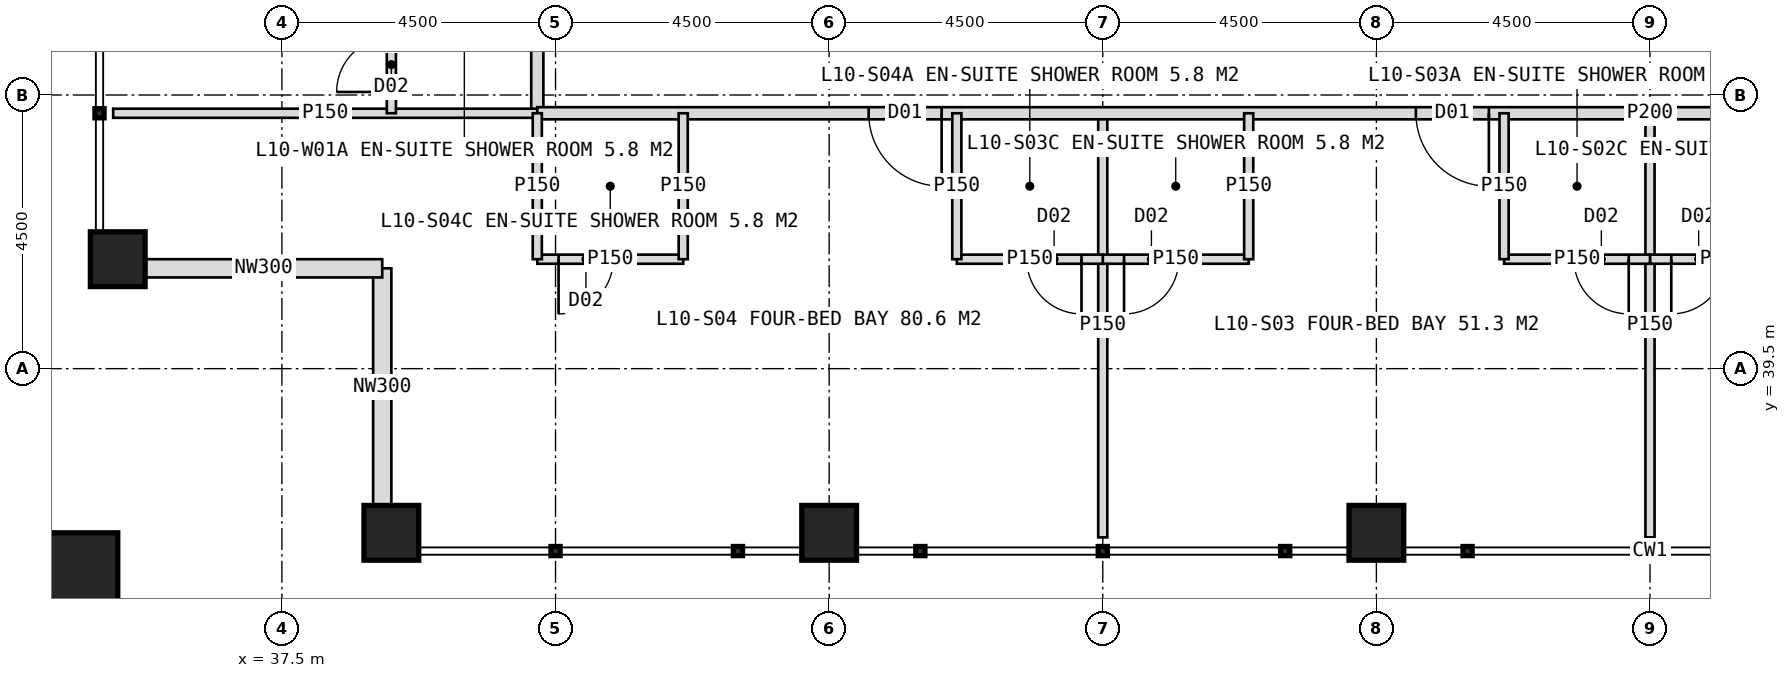
"""IFC4 building model, lengths in metres.
Left out: names, types, materials, properties, quantities, classifications, styles, units other than length and angle.
Written with IfcOpenShell. Run it as: python <this file> out.ifc"""

import sys

from ifc_helpers import new_model, si_unit, direction, frame, frame_2d, origin, origin_2d, place, context, subcontext, project, spatial, rectangle, hollow_rectangle, extrude, element, fill, save


model = new_model("IFC4")
c1 = context("Model", 3, precision=1e-05, world=origin(), true_north=direction((0.0, 1.0)))
c2 = subcontext(c1, "Body", "Model", "MODEL_VIEW")
j1 = project(units=[si_unit("LENGTHUNIT", "METRE"), si_unit("PLANEANGLEUNIT", "RADIAN")], contexts=[c1])
p1 = place(None, origin())
s1 = spatial("IfcSite", under=j1, at=p1, CompositionType="ELEMENT")
p2 = place(p1, origin())
s2 = spatial("IfcBuilding", under=s1, at=p2, CompositionType="ELEMENT")
p3 = place(p2, frame((0.0, 0.0, 47.0)))
s3 = spatial("IfcBuildingStorey", under=s2, at=p3, CompositionType="ELEMENT", Elevation=47.0)
for number, where, z_axis, x_axis in (
    (1, (39.3, 36.8, 0.0), (0.0, 0.0, 1.0), (1.0, 0.0, 0.0)),
    (2, (34.8, 41.3, 0.0), (0.0, 0.0, 1.0), (1.0, 0.0, 0.0)),
    (3, (46.5, 36.8, 0.0), (0.0, 0.0, 1.0), (1.0, 0.0, 0.0)),
    (4, (55.5, 36.8, 0.0), (0.0, 0.0, 1.0), (1.0, 0.0, 0.0)),
):
    element("IfcColumn", number, at=place(p3, frame(where, z_axis=z_axis, x_axis=x_axis)), inside=s3, PredefinedType="COLUMN", context=c2, shape_type="SweptSolid", body=[
        extrude(hollow_rectangle(XDim=0.9, YDim=0.9, WallThickness=0.08, at=origin_2d()), origin(), (0.0, 0.0, 1.0), 4.0),
    ])
p4 = place(p3, frame((33.9, 35.9, 0.0), z_axis=(0.0, 0.0, 1.0), x_axis=(1.0, 0.0, 0.0)))
e5 = element("IfcColumn", 5, at=p4, inside=s3, PredefinedType="COLUMN", context=c2, shape_type="SweptSolid", body=[
    extrude(hollow_rectangle(XDim=1.8, YDim=1.8, WallThickness=0.1, at=origin_2d()), origin(), (0.0, 0.0, 1.0), 4.0),
])
for number, where, z_axis, x_axis in (
    (6, (39.15, 37.25, 0.0), (0.0, 0.0, 1.0), (0.0, 1.0, 0.0)),
    (7, (39.15, 41.15, 0.0), (0.0, 0.0, 1.0), (-1.0, 0.0, 0.0)),
):
    element("IfcWall", number, at=place(p3, frame(where, z_axis=z_axis, x_axis=x_axis)), inside=s3, PredefinedType="ELEMENTEDWALL", context=c2, shape_type="SweptSolid", body=[
        extrude(rectangle(XDim=3.9, YDim=0.3, at=frame_2d((1.95, 0.0))), origin(), (0.0, 0.0, 1.0), 2.95),
    ])
p5 = place(p3, frame((41.7, 43.7, 0.0), z_axis=(0.0, 0.0, 1.0), x_axis=(0.0, 1.0, 0.0)))
e8 = element("IfcWall", 8, at=p5, inside=s3, PredefinedType="PARTITIONING", context=c2, shape_type="SweptSolid", body=[
    extrude(rectangle(XDim=36.6, YDim=0.2, at=frame_2d((18.3, 0.0))), origin(), (0.0, 0.0, 1.0), 3.75),
])
p6 = place(p5, frame((2.65, 0.0, 0.0)))
e9 = element("IfcOpeningElement", 9, at=p6, cuts=e8, PredefinedType="OPENING", context=c2, shape_type="SweptSolid", body=[
    extrude(rectangle(XDim=1.2, YDim=2.2, at=frame_2d((0.6, 1.1))), frame((0.0, 0.11, 0.0), z_axis=(0.0, -1.0, 0.0), x_axis=(1.0, 0.0, 0.0)), (0.0, 0.0, 1.0), 0.22),
])
p7 = place(p5, frame((8.95, 0.0, 0.0)))
e10 = element("IfcOpeningElement", 10, at=p7, cuts=e8, PredefinedType="OPENING", context=c2, shape_type="SweptSolid", body=[
    extrude(rectangle(XDim=1.2, YDim=2.2, at=frame_2d((0.6, 1.1))), frame((0.0, 0.11, 0.0), z_axis=(0.0, -1.0, 0.0), x_axis=(1.0, 0.0, 0.0)), (0.0, 0.0, 1.0), 0.22),
])
p8 = place(p5, frame((14.95, 0.0, 0.0)))
e11 = element("IfcOpeningElement", 11, at=p8, cuts=e8, PredefinedType="OPENING", context=c2, shape_type="SweptSolid", body=[
    extrude(rectangle(XDim=1.2, YDim=2.2, at=frame_2d((0.6, 1.1))), frame((0.0, 0.11, 0.0), z_axis=(0.0, -1.0, 0.0), x_axis=(1.0, 0.0, 0.0)), (0.0, 0.0, 1.0), 0.22),
])
p9 = place(p5, frame((20.95, 0.0, 0.0)))
e12 = element("IfcOpeningElement", 12, at=p9, cuts=e8, PredefinedType="OPENING", context=c2, shape_type="SweptSolid", body=[
    extrude(rectangle(XDim=1.2, YDim=2.2, at=frame_2d((0.6, 1.1))), frame((0.0, 0.11, 0.0), z_axis=(0.0, -1.0, 0.0), x_axis=(1.0, 0.0, 0.0)), (0.0, 0.0, 1.0), 0.22),
])
p10 = place(p5, frame((29.95, 0.0, 0.0)))
e13 = element("IfcOpeningElement", 13, at=p10, cuts=e8, PredefinedType="OPENING", context=c2, shape_type="SweptSolid", body=[
    extrude(rectangle(XDim=1.2, YDim=2.2, at=frame_2d((0.6, 1.1))), frame((0.0, 0.11, 0.0), z_axis=(0.0, -1.0, 0.0), x_axis=(1.0, 0.0, 0.0)), (0.0, 0.0, 1.0), 0.22),
])
p11 = place(p3, frame((41.7, 43.7, 0.0), z_axis=(0.0, 0.0, 1.0), x_axis=(-1.0, 0.0, 0.0)))
e14 = element("IfcWall", 14, at=p11, inside=s3, PredefinedType="PARTITIONING", context=c2, shape_type="SweptSolid", body=[
    extrude(rectangle(XDim=6.975, YDim=0.15, at=frame_2d((3.487, 0.0))), origin(), (0.0, 0.0, 1.0), 3.75),
])
p12 = place(p3, frame((39.3, 43.7, 0.0), z_axis=(0.0, 0.0, 1.0), x_axis=(0.0, 1.0, 0.0)))
e15 = element("IfcWall", 15, at=p12, inside=s3, PredefinedType="PARTITIONING", context=c2, shape_type="SweptSolid", body=[
    extrude(rectangle(XDim=2.4, YDim=0.15, at=frame_2d((1.2, 0.0))), origin(), (0.0, 0.0, 1.0), 2.95),
])
p13 = place(p12, frame((0.35, 0.0, 0.0)))
e16 = element("IfcOpeningElement", 16, at=p13, cuts=e15, PredefinedType="OPENING", context=c2, shape_type="SweptSolid", body=[
    extrude(rectangle(XDim=0.9, YDim=2.1, at=frame_2d((0.45, 1.05))), frame((0.0, 0.085, 0.0), z_axis=(0.0, -1.0, 0.0), x_axis=(1.0, 0.0, 0.0)), (0.0, 0.0, 1.0), 0.17),
])
p14 = place(p3, frame((60.0, 43.7, 0.0), z_axis=(0.0, 0.0, 1.0), x_axis=(0.0, -1.0, 0.0)))
e17 = element("IfcWall", 17, at=p14, inside=s3, PredefinedType="PARTITIONING", context=c2, shape_type="SweptSolid", body=[
    extrude(rectangle(XDim=6.975, YDim=0.15, at=frame_2d((3.487, 0.0))), origin(), (0.0, 0.0, 1.0), 2.75),
])
p15 = place(p3, frame((51.0, 43.7, 0.0), z_axis=(0.0, 0.0, 1.0), x_axis=(0.0, -1.0, 0.0)))
e18 = element("IfcWall", 18, at=p15, inside=s3, PredefinedType="PARTITIONING", context=c2, shape_type="SweptSolid", body=[
    extrude(rectangle(XDim=6.975, YDim=0.15, at=frame_2d((3.487, 0.0))), origin(), (0.0, 0.0, 1.0), 3.75),
])
p16 = place(p3, frame((78.3, 43.7, 0.0), z_axis=(0.0, 0.0, 1.0), x_axis=(-1.0, 0.0, 0.0)))
e19 = element("IfcWall", 19, at=p16, inside=s3, PredefinedType="PARTITIONING", context=c2, shape_type="SweptSolid", body=[
    extrude(rectangle(XDim=36.6, YDim=0.2, at=frame_2d((18.3, 0.0))), origin(), (0.0, 0.0, 1.0), 3.75),
])
p17 = place(p16, frame((2.65, 0.0, 0.0)))
e20 = element("IfcOpeningElement", 20, at=p17, cuts=e19, PredefinedType="OPENING", context=c2, shape_type="SweptSolid", body=[
    extrude(rectangle(XDim=1.2, YDim=2.2, at=frame_2d((0.6, 1.1))), frame((0.0, 0.11, 0.0), z_axis=(0.0, -1.0, 0.0), x_axis=(1.0, 0.0, 0.0)), (0.0, 0.0, 1.0), 0.22),
])
p18 = place(p16, frame((11.95, 0.0, 0.0)))
e21 = element("IfcOpeningElement", 21, at=p18, cuts=e19, PredefinedType="OPENING", context=c2, shape_type="SweptSolid", body=[
    extrude(rectangle(XDim=1.2, YDim=2.2, at=frame_2d((0.6, 1.1))), frame((0.0, 0.11, 0.0), z_axis=(0.0, -1.0, 0.0), x_axis=(1.0, 0.0, 0.0)), (0.0, 0.0, 1.0), 0.22),
])
p19 = place(p16, frame((20.95, 0.0, 0.0)))
e22 = element("IfcOpeningElement", 22, at=p19, cuts=e19, PredefinedType="OPENING", context=c2, shape_type="SweptSolid", body=[
    extrude(rectangle(XDim=1.2, YDim=2.2, at=frame_2d((0.6, 1.1))), frame((0.0, 0.11, 0.0), z_axis=(0.0, -1.0, 0.0), x_axis=(1.0, 0.0, 0.0)), (0.0, 0.0, 1.0), 0.22),
])
p20 = place(p16, frame((29.95, 0.0, 0.0)))
e23 = element("IfcOpeningElement", 23, at=p20, cuts=e19, PredefinedType="OPENING", context=c2, shape_type="SweptSolid", body=[
    extrude(rectangle(XDim=1.2, YDim=2.2, at=frame_2d((0.6, 1.1))), frame((0.0, 0.11, 0.0), z_axis=(0.0, -1.0, 0.0), x_axis=(1.0, 0.0, 0.0)), (0.0, 0.0, 1.0), 0.22),
])
p21 = place(p3, frame((62.4, 41.3, 0.0), z_axis=(0.0, 0.0, 1.0), x_axis=(-1.0, 0.0, 0.0)))
e24 = element("IfcWall", 24, at=p21, inside=s3, PredefinedType="PARTITIONING", context=c2, shape_type="SweptSolid", body=[
    extrude(rectangle(XDim=2.4, YDim=0.15, at=frame_2d((1.2, 0.0))), origin(), (0.0, 0.0, 1.0), 3.75),
])
p22 = place(p21, frame((1.15, 0.0, 0.0)))
e25 = element("IfcOpeningElement", 25, at=p22, cuts=e24, PredefinedType="OPENING", context=c2, shape_type="SweptSolid", body=[
    extrude(rectangle(XDim=0.9, YDim=2.1, at=frame_2d((0.45, 1.05))), frame((0.0, 0.085, 0.0), z_axis=(0.0, -1.0, 0.0), x_axis=(1.0, 0.0, 0.0)), (0.0, 0.0, 1.0), 0.17),
])
p23 = place(p3, frame((60.0, 41.3, 0.0), z_axis=(0.0, 0.0, 1.0), x_axis=(-1.0, 0.0, 0.0)))
e26 = element("IfcWall", 26, at=p23, inside=s3, PredefinedType="PARTITIONING", context=c2, shape_type="SweptSolid", body=[
    extrude(rectangle(XDim=2.4, YDim=0.15, at=frame_2d((1.2, 0.0))), origin(), (0.0, 0.0, 1.0), 3.75),
])
p24 = place(p23, frame((0.35, 0.0, 0.0)))
e27 = element("IfcOpeningElement", 27, at=p24, cuts=e26, PredefinedType="OPENING", context=c2, shape_type="SweptSolid", body=[
    extrude(rectangle(XDim=0.9, YDim=2.1, at=frame_2d((0.45, 1.05))), frame((0.0, 0.085, 0.0), z_axis=(0.0, -1.0, 0.0), x_axis=(1.0, 0.0, 0.0)), (0.0, 0.0, 1.0), 0.17),
])
p25 = place(p3, frame((57.6, 43.7, 0.0), z_axis=(0.0, 0.0, 1.0), x_axis=(0.0, -1.0, 0.0)))
e28 = element("IfcWall", 28, at=p25, inside=s3, PredefinedType="PARTITIONING", context=c2, shape_type="SweptSolid", body=[
    extrude(rectangle(XDim=2.4, YDim=0.15, at=frame_2d((1.2, 0.0))), origin(), (0.0, 0.0, 1.0), 3.75),
])
p26 = place(p3, frame((53.4, 41.3, 0.0), z_axis=(0.0, 0.0, 1.0), x_axis=(-1.0, 0.0, 0.0)))
e29 = element("IfcWall", 29, at=p26, inside=s3, PredefinedType="PARTITIONING", context=c2, shape_type="SweptSolid", body=[
    extrude(rectangle(XDim=2.4, YDim=0.15, at=frame_2d((1.2, 0.0))), origin(), (0.0, 0.0, 1.0), 3.75),
])
p27 = place(p26, frame((1.15, 0.0, 0.0)))
e30 = element("IfcOpeningElement", 30, at=p27, cuts=e29, PredefinedType="OPENING", context=c2, shape_type="SweptSolid", body=[
    extrude(rectangle(XDim=0.9, YDim=2.1, at=frame_2d((0.45, 1.05))), frame((0.0, 0.085, 0.0), z_axis=(0.0, -1.0, 0.0), x_axis=(1.0, 0.0, 0.0)), (0.0, 0.0, 1.0), 0.17),
])
p28 = place(p3, frame((53.4, 43.7, 0.0), z_axis=(0.0, 0.0, 1.0), x_axis=(0.0, -1.0, 0.0)))
e31 = element("IfcWall", 31, at=p28, inside=s3, PredefinedType="PARTITIONING", context=c2, shape_type="SweptSolid", body=[
    extrude(rectangle(XDim=2.4, YDim=0.15, at=frame_2d((1.2, 0.0))), origin(), (0.0, 0.0, 1.0), 3.75),
])
p29 = place(p3, frame((51.0, 41.3, 0.0), z_axis=(0.0, 0.0, 1.0), x_axis=(-1.0, 0.0, 0.0)))
e32 = element("IfcWall", 32, at=p29, inside=s3, PredefinedType="PARTITIONING", context=c2, shape_type="SweptSolid", body=[
    extrude(rectangle(XDim=2.4, YDim=0.15, at=frame_2d((1.2, 0.0))), origin(), (0.0, 0.0, 1.0), 3.75),
])
p30 = place(p29, frame((0.35, 0.0, 0.0)))
e33 = element("IfcOpeningElement", 33, at=p30, cuts=e32, PredefinedType="OPENING", context=c2, shape_type="SweptSolid", body=[
    extrude(rectangle(XDim=0.9, YDim=2.1, at=frame_2d((0.45, 1.05))), frame((0.0, 0.085, 0.0), z_axis=(0.0, -1.0, 0.0), x_axis=(1.0, 0.0, 0.0)), (0.0, 0.0, 1.0), 0.17),
])
p31 = place(p3, frame((48.6, 43.7, 0.0), z_axis=(0.0, 0.0, 1.0), x_axis=(0.0, -1.0, 0.0)))
e34 = element("IfcWall", 34, at=p31, inside=s3, PredefinedType="PARTITIONING", context=c2, shape_type="SweptSolid", body=[
    extrude(rectangle(XDim=2.4, YDim=0.15, at=frame_2d((1.2, 0.0))), origin(), (0.0, 0.0, 1.0), 3.75),
])
p32 = place(p3, frame((44.1, 41.3, 0.0), z_axis=(0.0, 0.0, 1.0), x_axis=(-1.0, 0.0, 0.0)))
e35 = element("IfcWall", 35, at=p32, inside=s3, PredefinedType="PARTITIONING", context=c2, shape_type="SweptSolid", body=[
    extrude(rectangle(XDim=2.4, YDim=0.15, at=frame_2d((1.2, 0.0))), origin(), (0.0, 0.0, 1.0), 2.95),
])
p33 = place(p32, frame((1.15, 0.0, 0.0)))
e36 = element("IfcOpeningElement", 36, at=p33, cuts=e35, PredefinedType="OPENING", context=c2, shape_type="SweptSolid", body=[
    extrude(rectangle(XDim=0.9, YDim=2.1, at=frame_2d((0.45, 1.05))), frame((0.0, 0.085, 0.0), z_axis=(0.0, -1.0, 0.0), x_axis=(1.0, 0.0, 0.0)), (0.0, 0.0, 1.0), 0.17),
])
for number, where, z_axis, x_axis in (
    (37, (44.1, 43.7, 0.0), (0.0, 0.0, 1.0), (0.0, -1.0, 0.0)),
    (38, (41.7, 43.7, 0.0), (0.0, 0.0, 1.0), (0.0, -1.0, 0.0)),
):
    element("IfcWall", number, at=place(p3, frame(where, z_axis=z_axis, x_axis=x_axis)), inside=s3, PredefinedType="PARTITIONING", context=c2, shape_type="SweptSolid", body=[
        extrude(rectangle(XDim=2.4, YDim=0.15, at=frame_2d((1.2, 0.0))), origin(), (0.0, 0.0, 1.0), 3.75),
    ])
p34 = place(p13, origin())
e39 = element("IfcDoor", 39, at=p34, inside=s3, OperationType="SINGLE_SWING_LEFT", PredefinedType="DOOR", context=c2, shape_type="SweptSolid", body=[
    extrude(rectangle(XDim=0.9, YDim=2.1, at=frame_2d((0.45, 1.05))), frame((0.0, 0.025, 0.0), z_axis=(0.0, -1.0, 0.0), x_axis=(1.0, 0.0, 0.0)), (0.0, 0.0, 1.0), 0.05),
])
fill(e16, e39)
p35 = place(p22, origin())
e40 = element("IfcDoor", 40, at=p35, inside=s3, OperationType="SINGLE_SWING_RIGHT", PredefinedType="DOOR", context=c2, shape_type="SweptSolid", body=[
    extrude(rectangle(XDim=0.9, YDim=2.1, at=frame_2d((0.45, 1.05))), frame((0.0, 0.025, 0.0), z_axis=(0.0, -1.0, 0.0), x_axis=(1.0, 0.0, 0.0)), (0.0, 0.0, 1.0), 0.05),
])
fill(e25, e40)
p36 = place(p19, origin())
e41 = element("IfcDoor", 41, at=p36, inside=s3, OperationType="SINGLE_SWING_LEFT", PredefinedType="DOOR", context=c2, shape_type="SweptSolid", body=[
    extrude(rectangle(XDim=1.2, YDim=2.2, at=frame_2d((0.6, 1.1))), frame((0.0, 0.025, 0.0), z_axis=(0.0, -1.0, 0.0), x_axis=(1.0, 0.0, 0.0)), (0.0, 0.0, 1.0), 0.05),
])
fill(e22, e41)
p37 = place(p24, origin())
e42 = element("IfcDoor", 42, at=p37, inside=s3, OperationType="SINGLE_SWING_LEFT", PredefinedType="DOOR", context=c2, shape_type="SweptSolid", body=[
    extrude(rectangle(XDim=0.9, YDim=2.1, at=frame_2d((0.45, 1.05))), frame((0.0, 0.025, 0.0), z_axis=(0.0, -1.0, 0.0), x_axis=(1.0, 0.0, 0.0)), (0.0, 0.0, 1.0), 0.05),
])
fill(e27, e42)
p38 = place(p27, origin())
e43 = element("IfcDoor", 43, at=p38, inside=s3, OperationType="SINGLE_SWING_RIGHT", PredefinedType="DOOR", context=c2, shape_type="SweptSolid", body=[
    extrude(rectangle(XDim=0.9, YDim=2.1, at=frame_2d((0.45, 1.05))), frame((0.0, 0.025, 0.0), z_axis=(0.0, -1.0, 0.0), x_axis=(1.0, 0.0, 0.0)), (0.0, 0.0, 1.0), 0.05),
])
fill(e30, e43)
p39 = place(p20, origin())
e44 = element("IfcDoor", 44, at=p39, inside=s3, OperationType="SINGLE_SWING_LEFT", PredefinedType="DOOR", context=c2, shape_type="SweptSolid", body=[
    extrude(rectangle(XDim=1.2, YDim=2.2, at=frame_2d((0.6, 1.1))), frame((0.0, 0.025, 0.0), z_axis=(0.0, -1.0, 0.0), x_axis=(1.0, 0.0, 0.0)), (0.0, 0.0, 1.0), 0.05),
])
fill(e23, e44)
p40 = place(p30, origin())
e45 = element("IfcDoor", 45, at=p40, inside=s3, OperationType="SINGLE_SWING_LEFT", PredefinedType="DOOR", context=c2, shape_type="SweptSolid", body=[
    extrude(rectangle(XDim=0.9, YDim=2.1, at=frame_2d((0.45, 1.05))), frame((0.0, 0.025, 0.0), z_axis=(0.0, -1.0, 0.0), x_axis=(1.0, 0.0, 0.0)), (0.0, 0.0, 1.0), 0.05),
])
fill(e33, e45)
p41 = place(p33, origin())
e46 = element("IfcDoor", 46, at=p41, inside=s3, OperationType="SINGLE_SWING_RIGHT", PredefinedType="DOOR", context=c2, shape_type="SweptSolid", body=[
    extrude(rectangle(XDim=0.9, YDim=2.1, at=frame_2d((0.45, 1.05))), frame((0.0, 0.025, 0.0), z_axis=(0.0, -1.0, 0.0), x_axis=(1.0, 0.0, 0.0)), (0.0, 0.0, 1.0), 0.05),
])
fill(e36, e46)
save(model, sys.argv[1])
